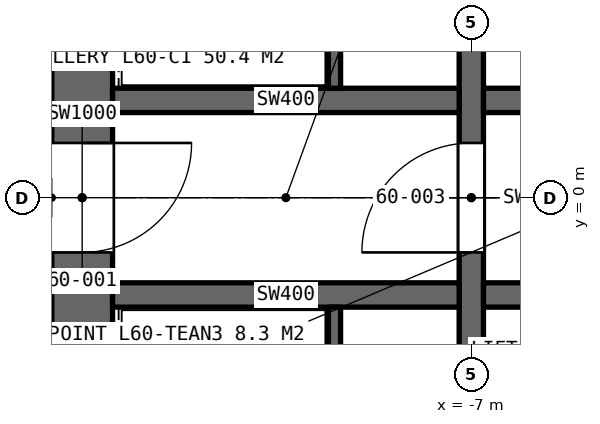
"""IFC4 building model, lengths in metres.
Left out: names, types, materials, properties, quantities, classifications, styles, units other than length and angle.
Written with IfcOpenShell. Run it as: python <this file> out.ifc"""

import sys

from ifc_helpers import new_model, si_unit, direction, frame, frame_2d, origin, place, context, subcontext, project, spatial, rectangle, extrude, element, fill, save


model = new_model("IFC4")
c1 = context("Model", 3, precision=1e-05, world=origin(), true_north=direction((0.0, 1.0)))
c2 = subcontext(c1, "Body", "Model", "MODEL_VIEW")
j1 = project(units=[si_unit("LENGTHUNIT", "METRE"), si_unit("PLANEANGLEUNIT", "RADIAN")], contexts=[c1])
p1 = place(None, origin())
s1 = spatial("IfcSite", under=j1, at=p1, CompositionType="ELEMENT")
p2 = place(p1, origin())
s2 = spatial("IfcBuilding", under=s1, at=p2, CompositionType="ELEMENT")
p3 = place(p2, frame((0.0, 0.0, 271.2)))
s3 = spatial("IfcBuildingStorey", under=s2, at=p3, CompositionType="ELEMENT", Elevation=271.2)
p4 = place(p3, frame((-13.4, 8.9, 0.0), z_axis=(0.0, 0.0, 1.0), x_axis=(0.0, -1.0, 0.0)))
e1 = element("IfcWall", 1, at=p4, inside=s3, PredefinedType="SHEAR", context=c2, shape_type="SweptSolid", body=[
    extrude(rectangle(XDim=17.8, YDim=1.0, at=frame_2d((8.9, 0.0))), origin(), (0.0, 0.0, 1.0), 4.2),
])
p5 = place(p4, frame((8.0, 0.0, 0.0)))
e2 = element("IfcOpeningElement", 2, at=p5, cuts=e1, PredefinedType="OPENING", context=c2, shape_type="SweptSolid", body=[
    extrude(rectangle(XDim=1.8, YDim=2.4, at=frame_2d((0.9, 1.2))), frame((0.0, 0.51, 0.0), z_axis=(0.0, -1.0, 0.0), x_axis=(1.0, 0.0, 0.0)), (0.0, 0.0, 1.0), 1.02),
])
p6 = place(p4, frame((16.6, 0.0, 0.0)))
e3 = element("IfcOpeningElement", 3, at=p6, cuts=e1, PredefinedType="OPENING", context=c2, shape_type="SweptSolid", body=[
    extrude(rectangle(XDim=1.0, YDim=2.4, at=frame_2d((0.5, 1.2))), frame((0.0, 0.51, 0.0), z_axis=(0.0, -1.0, 0.0), x_axis=(1.0, 0.0, 0.0)), (0.0, 0.0, 1.0), 1.02),
])
p7 = place(p3, frame((-7.0, -8.9, 0.0), z_axis=(0.0, 0.0, 1.0), x_axis=(0.0, 1.0, 0.0)))
e4 = element("IfcWall", 4, at=p7, inside=s3, PredefinedType="SHEAR", context=c2, shape_type="SweptSolid", body=[
    extrude(rectangle(XDim=17.8, YDim=0.4, at=frame_2d((8.9, 0.0))), origin(), (0.0, 0.0, 1.0), 4.2),
])
p8 = place(p7, frame((8.0, 0.0, 0.0)))
e5 = element("IfcOpeningElement", 5, at=p8, cuts=e4, PredefinedType="OPENING", context=c2, shape_type="SweptSolid", body=[
    extrude(rectangle(XDim=1.8, YDim=2.4, at=frame_2d((0.9, 1.2))), frame((0.0, 0.21, 0.0), z_axis=(0.0, -1.0, 0.0), x_axis=(1.0, 0.0, 0.0)), (0.0, 0.0, 1.0), 0.42),
])
p9 = place(p3, frame((-6.8, 1.6, 0.0), z_axis=(0.0, 0.0, 1.0), x_axis=(1.0, 0.0, 0.0)))
e6 = element("IfcWall", 6, at=p9, inside=s3, PredefinedType="SHEAR", context=c2, shape_type="SweptSolid", body=[
    extrude(rectangle(XDim=13.6, YDim=0.4, at=frame_2d((6.8, 0.0))), origin(), (0.0, 0.0, 1.0), 4.2),
])
p10 = place(p9, frame((1.365, 0.0, 0.0)))
e7 = element("IfcOpeningElement", 7, at=p10, cuts=e6, PredefinedType="OPENING", context=c2, shape_type="SweptSolid", body=[
    extrude(rectangle(XDim=1.0, YDim=2.4, at=frame_2d((0.5, 1.2))), frame((0.0, 0.21, 0.0), z_axis=(0.0, -1.0, 0.0), x_axis=(1.0, 0.0, 0.0)), (0.0, 0.0, 1.0), 0.42),
])
p11 = place(p9, frame((5.1, 0.0, 0.0)))
e8 = element("IfcOpeningElement", 8, at=p11, cuts=e6, PredefinedType="OPENING", context=c2, shape_type="SweptSolid", body=[
    extrude(rectangle(XDim=1.0, YDim=2.4, at=frame_2d((0.5, 1.2))), frame((0.0, 0.21, 0.0), z_axis=(0.0, -1.0, 0.0), x_axis=(1.0, 0.0, 0.0)), (0.0, 0.0, 1.0), 0.42),
])
p12 = place(p9, frame((8.635, 0.0, 0.0)))
e9 = element("IfcOpeningElement", 9, at=p12, cuts=e6, PredefinedType="OPENING", context=c2, shape_type="SweptSolid", body=[
    extrude(rectangle(XDim=1.0, YDim=2.4, at=frame_2d((0.5, 1.2))), frame((0.0, 0.21, 0.0), z_axis=(0.0, -1.0, 0.0), x_axis=(1.0, 0.0, 0.0)), (0.0, 0.0, 1.0), 0.42),
])
p13 = place(p9, frame((11.95, 0.0, 0.0)))
e10 = element("IfcOpeningElement", 10, at=p13, cuts=e6, PredefinedType="OPENING", context=c2, shape_type="SweptSolid", body=[
    extrude(rectangle(XDim=0.9, YDim=2.4, at=frame_2d((0.45, 1.2))), frame((0.0, 0.21, 0.0), z_axis=(0.0, -1.0, 0.0), x_axis=(1.0, 0.0, 0.0)), (0.0, 0.0, 1.0), 0.42),
])
p14 = place(p3, frame((-6.8, -1.6, 0.0), z_axis=(0.0, 0.0, 1.0), x_axis=(1.0, 0.0, 0.0)))
e11 = element("IfcWall", 11, at=p14, inside=s3, PredefinedType="SHEAR", context=c2, shape_type="SweptSolid", body=[
    extrude(rectangle(XDim=13.6, YDim=0.4, at=frame_2d((6.8, 0.0))), origin(), (0.0, 0.0, 1.0), 4.2),
])
p15 = place(p14, frame((11.9, 0.0, 0.0)))
e12 = element("IfcOpeningElement", 12, at=p15, cuts=e11, PredefinedType="OPENING", context=c2, shape_type="SweptSolid", body=[
    extrude(rectangle(XDim=1.0, YDim=2.4, at=frame_2d((0.5, 1.2))), frame((0.0, 0.21, 0.0), z_axis=(0.0, -1.0, 0.0), x_axis=(1.0, 0.0, 0.0)), (0.0, 0.0, 1.0), 0.42),
])
p16 = place(p14, frame((4.5, 0.0, 0.0)))
e13 = element("IfcOpeningElement", 13, at=p16, cuts=e11, PredefinedType="OPENING", context=c2, shape_type="SweptSolid", body=[
    extrude(rectangle(XDim=1.8, YDim=2.4, at=frame_2d((0.9, 1.2))), frame((0.0, 0.21, 0.0), z_axis=(0.0, -1.0, 0.0), x_axis=(1.0, 0.0, 0.0)), (0.0, 0.0, 1.0), 0.42),
])
for number, where, z_axis, x_axis in (
    (14, (-12.9, 1.6, 0.0), (0.0, 0.0, 1.0), (1.0, 0.0, 0.0)),
    (15, (-12.9, -1.6, 0.0), (0.0, 0.0, 1.0), (1.0, 0.0, 0.0)),
):
    element("IfcWall", number, at=place(p3, frame(where, z_axis=z_axis, x_axis=x_axis)), inside=s3, PredefinedType="SHEAR", context=c2, shape_type="SweptSolid", body=[
        extrude(rectangle(XDim=5.7, YDim=0.4, at=frame_2d((2.85, 0.0))), origin(), (0.0, 0.0, 1.0), 4.2),
    ])
for number, where, z_axis, x_axis in (
    (16, (-9.25, 7.2, 0.0), (0.0, 0.0, 1.0), (0.0, -1.0, 0.0)),
    (17, (-9.25, -7.2, 0.0), (0.0, 0.0, 1.0), (0.0, 1.0, 0.0)),
):
    element("IfcWall", number, at=place(p3, frame(where, z_axis=z_axis, x_axis=x_axis)), inside=s3, PredefinedType="SOLIDWALL", context=c2, shape_type="SweptSolid", body=[
        extrude(rectangle(XDim=5.4, YDim=0.2, at=frame_2d((2.7, 0.0))), origin(), (0.0, 0.0, 1.0), 4.2),
    ])
p17 = place(p5, origin())
e18 = element("IfcDoor", 18, at=p17, inside=s3, OperationType="DOUBLE_DOOR_SINGLE_SWING", PredefinedType="DOOR", context=c2, shape_type="SweptSolid", body=[
    extrude(rectangle(XDim=1.8, YDim=2.4, at=frame_2d((0.9, 1.2))), frame((0.0, 0.025, 0.0), z_axis=(0.0, -1.0, 0.0), x_axis=(1.0, 0.0, 0.0)), (0.0, 0.0, 1.0), 0.05),
])
fill(e2, e18)
p18 = place(p8, origin())
e19 = element("IfcDoor", 19, at=p18, inside=s3, OperationType="DOUBLE_DOOR_SINGLE_SWING", PredefinedType="DOOR", context=c2, shape_type="SweptSolid", body=[
    extrude(rectangle(XDim=1.8, YDim=2.4, at=frame_2d((0.9, 1.2))), frame((0.0, 0.025, 0.0), z_axis=(0.0, -1.0, 0.0), x_axis=(1.0, 0.0, 0.0)), (0.0, 0.0, 1.0), 0.05),
])
fill(e5, e19)
save(model, sys.argv[1])
